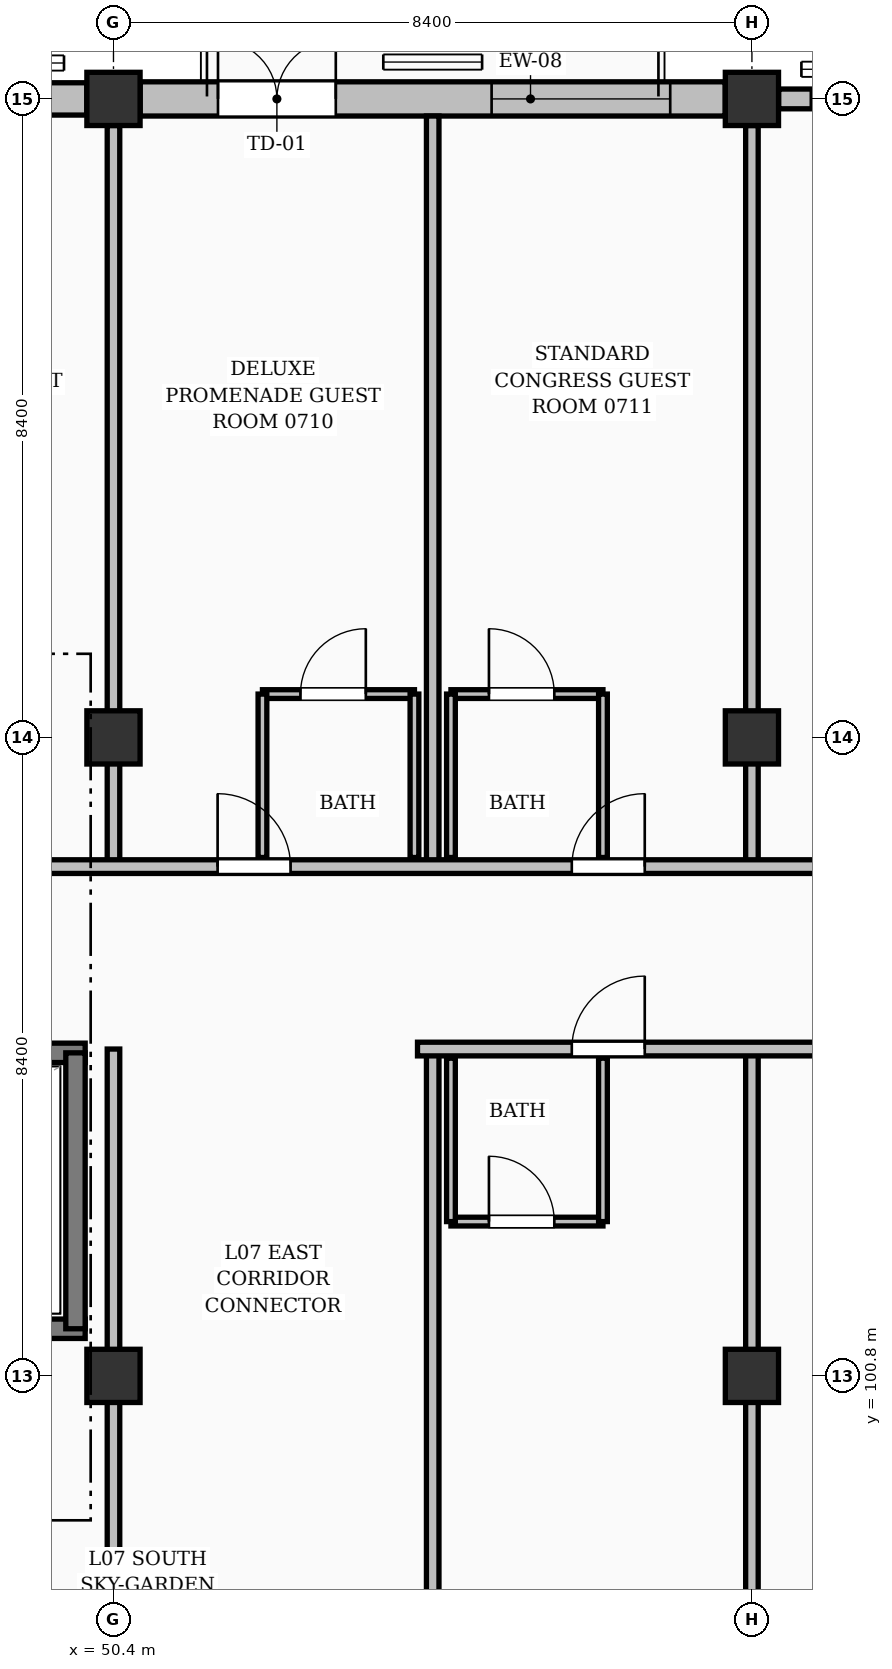
"""IFC4 building model, lengths in metres.
Left out: names, types, materials, properties, quantities, classifications, styles, units other than length and angle.
Written with IfcOpenShell. Run it as: python <this file> out.ifc"""

import sys

from ifc_helpers import new_model, si_unit, direction, frame, frame_2d, origin, origin_2d, place, context, subcontext, project, spatial, rectangle, extrude, element, fill, save


model = new_model("IFC4")
c1 = context("Model", 3, precision=1e-05, world=origin(), true_north=direction((0.0, 1.0)))
c2 = subcontext(c1, "Body", "Model", "MODEL_VIEW")
j1 = project(units=[si_unit("LENGTHUNIT", "METRE"), si_unit("PLANEANGLEUNIT", "RADIAN")], contexts=[c1])
p1 = place(None, origin())
s1 = spatial("IfcSite", under=j1, at=p1, CompositionType="ELEMENT")
p2 = place(p1, origin())
s2 = spatial("IfcBuilding", under=s1, at=p2, CompositionType="ELEMENT")
p3 = place(p2, frame((0.0, 0.0, 25.2)))
s3 = spatial("IfcBuildingStorey", under=s2, at=p3, CompositionType="ELEMENT", Elevation=25.2)
for number, where, z_axis, x_axis in (
    (1, (50.4, 100.8, 0.0), (0.0, 0.0, 1.0), (1.0, 0.0, 0.0)),
    (2, (50.4, 109.2, 0.0), (0.0, 0.0, 1.0), (1.0, 0.0, 0.0)),
    (3, (50.4, 117.6, 0.0), (0.0, 0.0, 1.0), (1.0, 0.0, 0.0)),
    (4, (58.8, 100.8, 0.0), (0.0, 0.0, 1.0), (1.0, 0.0, 0.0)),
    (5, (58.8, 109.2, 0.0), (0.0, 0.0, 1.0), (1.0, 0.0, 0.0)),
    (6, (58.8, 117.6, 0.0), (0.0, 0.0, 1.0), (1.0, 0.0, 0.0)),
):
    element("IfcColumn", number, at=place(p3, frame(where, z_axis=z_axis, x_axis=x_axis)), inside=s3, PredefinedType="COLUMN", context=c2, shape_type="SweptSolid", body=[
        extrude(rectangle(XDim=0.7, YDim=0.7, at=origin_2d()), origin(), (0.0, 0.0, 1.0), 3.36),
    ])
p4 = place(p3, frame((42.351, 117.6, 0.0), z_axis=(0.0, 0.0, 1.0), x_axis=(1.0, 0.0, 0.0)))
e7 = element("IfcWall", 7, at=p4, inside=s3, PredefinedType="SOLIDWALL", context=c2, shape_type="SweptSolid", body=[
    extrude(rectangle(XDim=7.698, YDim=0.425, at=frame_2d((3.849, 0.0))), origin(), (0.0, 0.0, 1.0), 2.414),
])
p5 = place(p4, frame((0.574, 0.0, 0.25)))
e8 = element("IfcOpeningElement", 8, at=p5, cuts=e7, PredefinedType="OPENING", context=c2, shape_type="SweptSolid", body=[
    extrude(rectangle(XDim=2.35, YDim=1.85, at=frame_2d((1.175, 0.925))), frame((0.0, 0.223, 0.0), z_axis=(0.0, -1.0, 0.0), x_axis=(1.0, 0.0, 0.0)), (0.0, 0.0, 1.0), 0.445),
])
p6 = place(p4, frame((4.774, 0.0, 0.25)))
e9 = element("IfcOpeningElement", 9, at=p6, cuts=e7, PredefinedType="OPENING", context=c2, shape_type="SweptSolid", body=[
    extrude(rectangle(XDim=2.35, YDim=1.95, at=frame_2d((1.175, 0.975))), frame((0.0, 0.223, 0.0), z_axis=(0.0, -1.0, 0.0), x_axis=(1.0, 0.0, 0.0)), (0.0, 0.0, 1.0), 0.445),
])
p7 = place(p3, frame((50.751, 117.6, 0.0), z_axis=(0.0, 0.0, 1.0), x_axis=(1.0, 0.0, 0.0)))
e10 = element("IfcWall", 10, at=p7, inside=s3, PredefinedType="SOLIDWALL", context=c2, shape_type="SweptSolid", body=[
    extrude(rectangle(XDim=7.698, YDim=0.45, at=frame_2d((3.849, 0.0))), origin(), (0.0, 0.0, 1.0), 2.414),
])
p8 = place(p7, frame((1.024, 0.0, 0.0)))
e11 = element("IfcOpeningElement", 11, at=p8, cuts=e10, PredefinedType="OPENING", context=c2, shape_type="SweptSolid", body=[
    extrude(rectangle(XDim=1.55, YDim=2.08, at=frame_2d((0.775, 1.04))), frame((0.0, 0.235, 0.0), z_axis=(0.0, -1.0, 0.0), x_axis=(1.0, 0.0, 0.0)), (0.0, 0.0, 1.0), 0.47),
])
p9 = place(p7, frame((4.624, 0.0, 0.25)))
e12 = element("IfcOpeningElement", 12, at=p9, cuts=e10, PredefinedType="OPENING", context=c2, shape_type="SweptSolid", body=[
    extrude(rectangle(XDim=2.35, YDim=1.95, at=frame_2d((1.175, 0.975))), frame((0.0, 0.235, 0.0), z_axis=(0.0, -1.0, 0.0), x_axis=(1.0, 0.0, 0.0)), (0.0, 0.0, 1.0), 0.47),
])
p10 = place(p3, frame((59.151, 117.6, 0.0), z_axis=(0.0, 0.0, 1.0), x_axis=(1.0, 0.0, 0.0)))
e13 = element("IfcWall", 13, at=p10, inside=s3, PredefinedType="SOLIDWALL", context=c2, shape_type="SweptSolid", body=[
    extrude(rectangle(XDim=7.698, YDim=0.26, at=frame_2d((3.849, 0.0))), origin(), (0.0, 0.0, 1.0), 2.414),
])
p11 = place(p10, frame((0.424, 0.0, 0.25)))
e14 = element("IfcOpeningElement", 14, at=p11, cuts=e13, PredefinedType="OPENING", context=c2, shape_type="SweptSolid", body=[
    extrude(rectangle(XDim=2.65, YDim=1.95, at=frame_2d((1.325, 0.975))), frame((0.0, 0.14, 0.0), z_axis=(0.0, -1.0, 0.0), x_axis=(1.0, 0.0, 0.0)), (0.0, 0.0, 1.0), 0.28),
])
p12 = place(p10, frame((4.699, 0.0, 0.25)))
e15 = element("IfcOpeningElement", 15, at=p12, cuts=e13, PredefinedType="OPENING", context=c2, shape_type="SweptSolid", body=[
    extrude(rectangle(XDim=2.5, YDim=1.75, at=frame_2d((1.25, 0.875))), frame((0.0, 0.14, 0.0), z_axis=(0.0, -1.0, 0.0), x_axis=(1.0, 0.0, 0.0)), (0.0, 0.0, 1.0), 0.28),
])
p13 = place(p3, frame((41.802, 101.42, 0.0), z_axis=(0.0, 0.0, 1.0), x_axis=(1.0, 0.0, 0.0)))
e16 = element("IfcWall", 16, at=p13, inside=s3, PredefinedType="SOLIDWALL", context=c2, shape_type="SweptSolid", body=[
    extrude(rectangle(XDim=8.225, YDim=0.255, at=frame_2d((4.113, 0.0))), origin(), (0.0, 0.0, 1.0), 3.12),
])
p14 = place(p3, frame((41.802, 105.05, 0.0), z_axis=(0.0, 0.0, 1.0), x_axis=(1.0, 0.0, 0.0)))
e17 = element("IfcWall", 17, at=p14, inside=s3, PredefinedType="SOLIDWALL", context=c2, shape_type="SweptSolid", body=[
    extrude(rectangle(XDim=8.225, YDim=0.255, at=frame_2d((4.113, 0.0))), origin(), (0.0, 0.0, 1.0), 3.12),
])
p15 = place(p14, frame((0.35, 0.0, 0.0)))
e18 = element("IfcOpeningElement", 18, at=p15, cuts=e17, PredefinedType="OPENING", context=c2, shape_type="SweptSolid", body=[
    extrude(rectangle(XDim=1.16, YDim=2.15, at=frame_2d((0.58, 1.075))), frame((0.0, 0.137, 0.0), z_axis=(0.0, -1.0, 0.0), x_axis=(1.0, 0.0, 0.0)), (0.0, 0.0, 1.0), 0.275),
])
p16 = place(p3, frame((49.9, 101.42, 0.0), z_axis=(0.0, 0.0, 1.0), x_axis=(0.0, 1.0, 0.0)))
e19 = element("IfcWall", 19, at=p16, inside=s3, PredefinedType="SOLIDWALL", context=c2, shape_type="SweptSolid", body=[
    extrude(rectangle(XDim=3.63, YDim=0.255, at=frame_2d((1.815, 0.0))), origin(), (0.0, 0.0, 1.0), 3.12),
])
p17 = place(p3, frame((52.36, 109.77, 0.0), z_axis=(0.0, 0.0, 1.0), x_axis=(1.0, 0.0, 0.0)))
e20 = element("IfcWall", 20, at=p17, inside=s3, PredefinedType="PARTITIONING", context=c2, shape_type="SweptSolid", body=[
    extrude(rectangle(XDim=2.0, YDim=0.115, at=frame_2d((1.0, 0.0))), origin(), (0.0, 0.0, 1.0), 3.12),
])
p18 = place(p17, frame((0.5, 0.0, 0.0)))
e21 = element("IfcOpeningElement", 21, at=p18, cuts=e20, PredefinedType="OPENING", context=c2, shape_type="SweptSolid", body=[
    extrude(rectangle(XDim=0.86, YDim=2.05, at=frame_2d((0.43, 1.025))), frame((0.0, 0.067, 0.0), z_axis=(0.0, -1.0, 0.0), x_axis=(1.0, 0.0, 0.0)), (0.0, 0.0, 1.0), 0.135),
])
for number, where, z_axis, x_axis in (
    (22, (52.36, 107.62, 0.0), (0.0, 0.0, 1.0), (0.0, 1.0, 0.0)),
    (23, (54.36, 107.62, 0.0), (0.0, 0.0, 1.0), (0.0, 1.0, 0.0)),
):
    element("IfcWall", number, at=place(p3, frame(where, z_axis=z_axis, x_axis=x_axis)), inside=s3, PredefinedType="PARTITIONING", context=c2, shape_type="SweptSolid", body=[
        extrude(rectangle(XDim=2.15, YDim=0.115, at=frame_2d((1.075, 0.0))), origin(), (0.0, 0.0, 1.0), 3.12),
    ])
p19 = place(p3, frame((54.84, 109.77, 0.0), z_axis=(0.0, 0.0, 1.0), x_axis=(1.0, 0.0, 0.0)))
e24 = element("IfcWall", 24, at=p19, inside=s3, PredefinedType="PARTITIONING", context=c2, shape_type="SweptSolid", body=[
    extrude(rectangle(XDim=2.0, YDim=0.115, at=frame_2d((1.0, 0.0))), origin(), (0.0, 0.0, 1.0), 3.12),
])
p20 = place(p19, frame((0.5, 0.0, 0.0)))
e25 = element("IfcOpeningElement", 25, at=p20, cuts=e24, PredefinedType="OPENING", context=c2, shape_type="SweptSolid", body=[
    extrude(rectangle(XDim=0.86, YDim=2.05, at=frame_2d((0.43, 1.025))), frame((0.0, 0.067, 0.0), z_axis=(0.0, -1.0, 0.0), x_axis=(1.0, 0.0, 0.0)), (0.0, 0.0, 1.0), 0.135),
])
for number, where, z_axis, x_axis in (
    (26, (54.84, 107.62, 0.0), (0.0, 0.0, 1.0), (0.0, 1.0, 0.0)),
    (27, (56.84, 107.62, 0.0), (0.0, 0.0, 1.0), (0.0, 1.0, 0.0)),
):
    element("IfcWall", number, at=place(p3, frame(where, z_axis=z_axis, x_axis=x_axis)), inside=s3, PredefinedType="PARTITIONING", context=c2, shape_type="SweptSolid", body=[
        extrude(rectangle(XDim=2.15, YDim=0.115, at=frame_2d((1.075, 0.0))), origin(), (0.0, 0.0, 1.0), 3.12),
    ])
p21 = place(p3, frame((54.6, 107.5, 0.0), z_axis=(0.0, 0.0, 1.0), x_axis=(0.0, 1.0, 0.0)))
e28 = element("IfcWall", 28, at=p21, inside=s3, PredefinedType="PARTITIONING", context=c2, shape_type="SweptSolid", body=[
    extrude(rectangle(XDim=9.875, YDim=0.165, at=frame_2d((4.938, 0.0))), origin(), (0.0, 0.0, 1.0), 3.12),
])
for number, where, z_axis, x_axis in (
    (29, (50.4, 107.5, 0.0), (0.0, 0.0, 1.0), (0.0, 1.0, 0.0)),
    (30, (58.8, 107.5, 0.0), (0.0, 0.0, 1.0), (0.0, 1.0, 0.0)),
):
    element("IfcWall", number, at=place(p3, frame(where, z_axis=z_axis, x_axis=x_axis)), inside=s3, PredefinedType="PARTITIONING", context=c2, shape_type="SweptSolid", body=[
        extrude(rectangle(XDim=9.75, YDim=0.165, at=frame_2d((4.875, 0.0))), origin(), (0.0, 0.0, 1.0), 2.013),
    ])
p22 = place(p3, frame((40.66, 107.5, 0.0), z_axis=(0.0, 0.0, 1.0), x_axis=(1.0, 0.0, 0.0)))
e31 = element("IfcWall", 31, at=p22, inside=s3, PredefinedType="PARTITIONING", context=c2, shape_type="SweptSolid", body=[
    extrude(rectangle(XDim=26.39, YDim=0.18, at=frame_2d((13.195, 0.0))), origin(), (0.0, 0.0, 1.0), 3.12),
])
p23 = place(p22, frame((0.2, 0.0, 0.0)))
e32 = element("IfcOpeningElement", 32, at=p23, cuts=e31, PredefinedType="OPENING", context=c2, shape_type="SweptSolid", body=[
    extrude(rectangle(XDim=0.94, YDim=2.1, at=frame_2d((0.47, 1.05))), frame((0.0, 0.1, 0.0), z_axis=(0.0, -1.0, 0.0), x_axis=(1.0, 0.0, 0.0)), (0.0, 0.0, 1.0), 0.2),
])
p24 = place(p22, frame((2.71, 0.0, 0.0)))
e33 = element("IfcOpeningElement", 33, at=p24, cuts=e31, PredefinedType="OPENING", context=c2, shape_type="SweptSolid", body=[
    extrude(rectangle(XDim=0.96, YDim=2.15, at=frame_2d((0.48, 1.075))), frame((0.0, 0.1, 0.0), z_axis=(0.0, -1.0, 0.0), x_axis=(1.0, 0.0, 0.0)), (0.0, 0.0, 1.0), 0.2),
])
p25 = place(p22, frame((7.37, 0.0, 0.0)))
e34 = element("IfcOpeningElement", 34, at=p25, cuts=e31, PredefinedType="OPENING", context=c2, shape_type="SweptSolid", body=[
    extrude(rectangle(XDim=0.96, YDim=2.15, at=frame_2d((0.48, 1.075))), frame((0.0, 0.1, 0.0), z_axis=(0.0, -1.0, 0.0), x_axis=(1.0, 0.0, 0.0)), (0.0, 0.0, 1.0), 0.2),
])
p26 = place(p22, frame((11.11, 0.0, 0.0)))
e35 = element("IfcOpeningElement", 35, at=p26, cuts=e31, PredefinedType="OPENING", context=c2, shape_type="SweptSolid", body=[
    extrude(rectangle(XDim=0.96, YDim=2.15, at=frame_2d((0.48, 1.075))), frame((0.0, 0.1, 0.0), z_axis=(0.0, -1.0, 0.0), x_axis=(1.0, 0.0, 0.0)), (0.0, 0.0, 1.0), 0.2),
])
p27 = place(p22, frame((15.77, 0.0, 0.0)))
e36 = element("IfcOpeningElement", 36, at=p27, cuts=e31, PredefinedType="OPENING", context=c2, shape_type="SweptSolid", body=[
    extrude(rectangle(XDim=0.96, YDim=2.15, at=frame_2d((0.48, 1.075))), frame((0.0, 0.1, 0.0), z_axis=(0.0, -1.0, 0.0), x_axis=(1.0, 0.0, 0.0)), (0.0, 0.0, 1.0), 0.2),
])
p28 = place(p22, frame((19.64, 0.0, 0.0)))
e37 = element("IfcOpeningElement", 37, at=p28, cuts=e31, PredefinedType="OPENING", context=c2, shape_type="SweptSolid", body=[
    extrude(rectangle(XDim=1.02, YDim=2.15, at=frame_2d((0.51, 1.075))), frame((0.0, 0.1, 0.0), z_axis=(0.0, -1.0, 0.0), x_axis=(1.0, 0.0, 0.0)), (0.0, 0.0, 1.0), 0.2),
])
p29 = place(p3, frame((54.84, 102.83, 0.0), z_axis=(0.0, 0.0, 1.0), x_axis=(1.0, 0.0, 0.0)))
e38 = element("IfcWall", 38, at=p29, inside=s3, PredefinedType="PARTITIONING", context=c2, shape_type="SweptSolid", body=[
    extrude(rectangle(XDim=2.0, YDim=0.115, at=frame_2d((1.0, 0.0))), origin(), (0.0, 0.0, 1.0), 3.12),
])
p30 = place(p29, frame((0.5, 0.0, 0.0)))
e39 = element("IfcOpeningElement", 39, at=p30, cuts=e38, PredefinedType="OPENING", context=c2, shape_type="SweptSolid", body=[
    extrude(rectangle(XDim=0.86, YDim=2.05, at=frame_2d((0.43, 1.025))), frame((0.0, 0.067, 0.0), z_axis=(0.0, -1.0, 0.0), x_axis=(1.0, 0.0, 0.0)), (0.0, 0.0, 1.0), 0.135),
])
for number, where, z_axis, x_axis in (
    (40, (54.84, 102.83, 0.0), (0.0, 0.0, 1.0), (0.0, 1.0, 0.0)),
    (41, (56.84, 102.83, 0.0), (0.0, 0.0, 1.0), (0.0, 1.0, 0.0)),
):
    element("IfcWall", number, at=place(p3, frame(where, z_axis=z_axis, x_axis=x_axis)), inside=s3, PredefinedType="PARTITIONING", context=c2, shape_type="SweptSolid", body=[
        extrude(rectangle(XDim=2.15, YDim=0.115, at=frame_2d((1.075, 0.0))), origin(), (0.0, 0.0, 1.0), 3.12),
    ])
p31 = place(p3, frame((54.6, 92.625, 0.0), z_axis=(0.0, 0.0, 1.0), x_axis=(0.0, 1.0, 0.0)))
e42 = element("IfcWall", 42, at=p31, inside=s3, PredefinedType="PARTITIONING", context=c2, shape_type="SweptSolid", body=[
    extrude(rectangle(XDim=12.475, YDim=0.165, at=frame_2d((6.238, 0.0))), origin(), (0.0, 0.0, 1.0), 3.12),
])
for number, where, z_axis, x_axis in (
    (43, (50.4, 92.75, 0.0), (0.0, 0.0, 1.0), (0.0, 1.0, 0.0)),
    (44, (58.8, 92.75, 0.0), (0.0, 0.0, 1.0), (0.0, 1.0, 0.0)),
):
    element("IfcWall", number, at=place(p3, frame(where, z_axis=z_axis, x_axis=x_axis)), inside=s3, PredefinedType="PARTITIONING", context=c2, shape_type="SweptSolid", body=[
        extrude(rectangle(XDim=12.35, YDim=0.165, at=frame_2d((6.175, 0.0))), origin(), (0.0, 0.0, 1.0), 2.455),
    ])
p32 = place(p3, frame((54.4, 105.1, 0.0), z_axis=(0.0, 0.0, 1.0), x_axis=(1.0, 0.0, 0.0)))
e45 = element("IfcWall", 45, at=p32, inside=s3, PredefinedType="PARTITIONING", context=c2, shape_type="SweptSolid", body=[
    extrude(rectangle(XDim=12.65, YDim=0.18, at=frame_2d((6.325, 0.0))), origin(), (0.0, 0.0, 1.0), 3.12),
])
p33 = place(p32, frame((2.03, 0.0, 0.0)))
e46 = element("IfcOpeningElement", 46, at=p33, cuts=e45, PredefinedType="OPENING", context=c2, shape_type="SweptSolid", body=[
    extrude(rectangle(XDim=0.96, YDim=2.15, at=frame_2d((0.48, 1.075))), frame((0.0, 0.1, 0.0), z_axis=(0.0, -1.0, 0.0), x_axis=(1.0, 0.0, 0.0)), (0.0, 0.0, 1.0), 0.2),
])
p34 = place(p32, frame((5.9, 0.0, 0.0)))
e47 = element("IfcOpeningElement", 47, at=p34, cuts=e45, PredefinedType="OPENING", context=c2, shape_type="SweptSolid", body=[
    extrude(rectangle(XDim=1.02, YDim=2.15, at=frame_2d((0.51, 1.075))), frame((0.0, 0.1, 0.0), z_axis=(0.0, -1.0, 0.0), x_axis=(1.0, 0.0, 0.0)), (0.0, 0.0, 1.0), 0.2),
])
p35 = place(p8, origin())
e48 = element("IfcDoor", 48, at=p35, inside=s3, OperationType="DOUBLE_DOOR_SINGLE_SWING", PredefinedType="DOOR", context=c2, shape_type="SweptSolid", body=[
    extrude(rectangle(XDim=1.55, YDim=2.08, at=frame_2d((0.775, 1.04))), frame((0.0, 0.025, 0.0), z_axis=(0.0, -1.0, 0.0), x_axis=(1.0, 0.0, 0.0)), (0.0, 0.0, 1.0), 0.05),
])
fill(e11, e48)
p36 = place(p9, origin())
e49 = element("IfcWindow", 49, at=p36, inside=s3, PartitioningType="DOUBLE_PANEL_VERTICAL", PredefinedType="WINDOW", context=c2, shape_type="SweptSolid", body=[
    extrude(rectangle(XDim=2.35, YDim=1.95, at=frame_2d((1.175, 0.975))), frame((0.0, 0.03, 0.0), z_axis=(0.0, -1.0, 0.0), x_axis=(1.0, 0.0, 0.0)), (0.0, 0.0, 1.0), 0.06),
])
fill(e12, e49)
p37 = place(p11, origin())
e50 = element("IfcWindow", 50, at=p37, inside=s3, PartitioningType="DOUBLE_PANEL_VERTICAL", PredefinedType="WINDOW", context=c2, shape_type="SweptSolid", body=[
    extrude(rectangle(XDim=2.65, YDim=1.95, at=frame_2d((1.325, 0.975))), frame((0.0, 0.03, 0.0), z_axis=(0.0, -1.0, 0.0), x_axis=(1.0, 0.0, 0.0)), (0.0, 0.0, 1.0), 0.06),
])
fill(e14, e50)
p38 = place(p18, origin())
e51 = element("IfcDoor", 51, at=p38, inside=s3, OperationType="SINGLE_SWING_RIGHT", PredefinedType="DOOR", context=c2, shape_type="SweptSolid", body=[
    extrude(rectangle(XDim=0.86, YDim=2.05, at=frame_2d((0.43, 1.025))), frame((0.0, 0.025, 0.0), z_axis=(0.0, -1.0, 0.0), x_axis=(1.0, 0.0, 0.0)), (0.0, 0.0, 1.0), 0.05),
])
fill(e21, e51)
p39 = place(p20, origin())
e52 = element("IfcDoor", 52, at=p39, inside=s3, OperationType="SINGLE_SWING_LEFT", PredefinedType="DOOR", context=c2, shape_type="SweptSolid", body=[
    extrude(rectangle(XDim=0.86, YDim=2.05, at=frame_2d((0.43, 1.025))), frame((0.0, 0.025, 0.0), z_axis=(0.0, -1.0, 0.0), x_axis=(1.0, 0.0, 0.0)), (0.0, 0.0, 1.0), 0.05),
])
fill(e25, e52)
p40 = place(p26, origin())
e53 = element("IfcDoor", 53, at=p40, inside=s3, OperationType="SINGLE_SWING_LEFT", PredefinedType="DOOR", context=c2, shape_type="SweptSolid", body=[
    extrude(rectangle(XDim=0.96, YDim=2.15, at=frame_2d((0.48, 1.075))), frame((0.0, 0.025, 0.0), z_axis=(0.0, -1.0, 0.0), x_axis=(1.0, 0.0, 0.0)), (0.0, 0.0, 1.0), 0.05),
])
fill(e35, e53)
p41 = place(p27, origin())
e54 = element("IfcDoor", 54, at=p41, inside=s3, OperationType="SINGLE_SWING_RIGHT", PredefinedType="DOOR", context=c2, shape_type="SweptSolid", body=[
    extrude(rectangle(XDim=0.96, YDim=2.15, at=frame_2d((0.48, 1.075))), frame((0.0, 0.025, 0.0), z_axis=(0.0, -1.0, 0.0), x_axis=(1.0, 0.0, 0.0)), (0.0, 0.0, 1.0), 0.05),
])
fill(e36, e54)
p42 = place(p30, origin())
e55 = element("IfcDoor", 55, at=p42, inside=s3, OperationType="SINGLE_SWING_LEFT", PredefinedType="DOOR", context=c2, shape_type="SweptSolid", body=[
    extrude(rectangle(XDim=0.86, YDim=2.05, at=frame_2d((0.43, 1.025))), frame((0.0, 0.025, 0.0), z_axis=(0.0, -1.0, 0.0), x_axis=(1.0, 0.0, 0.0)), (0.0, 0.0, 1.0), 0.05),
])
fill(e39, e55)
p43 = place(p33, origin())
e56 = element("IfcDoor", 56, at=p43, inside=s3, OperationType="SINGLE_SWING_RIGHT", PredefinedType="DOOR", context=c2, shape_type="SweptSolid", body=[
    extrude(rectangle(XDim=0.96, YDim=2.15, at=frame_2d((0.48, 1.075))), frame((0.0, 0.025, 0.0), z_axis=(0.0, -1.0, 0.0), x_axis=(1.0, 0.0, 0.0)), (0.0, 0.0, 1.0), 0.05),
])
fill(e46, e56)
save(model, sys.argv[1])
